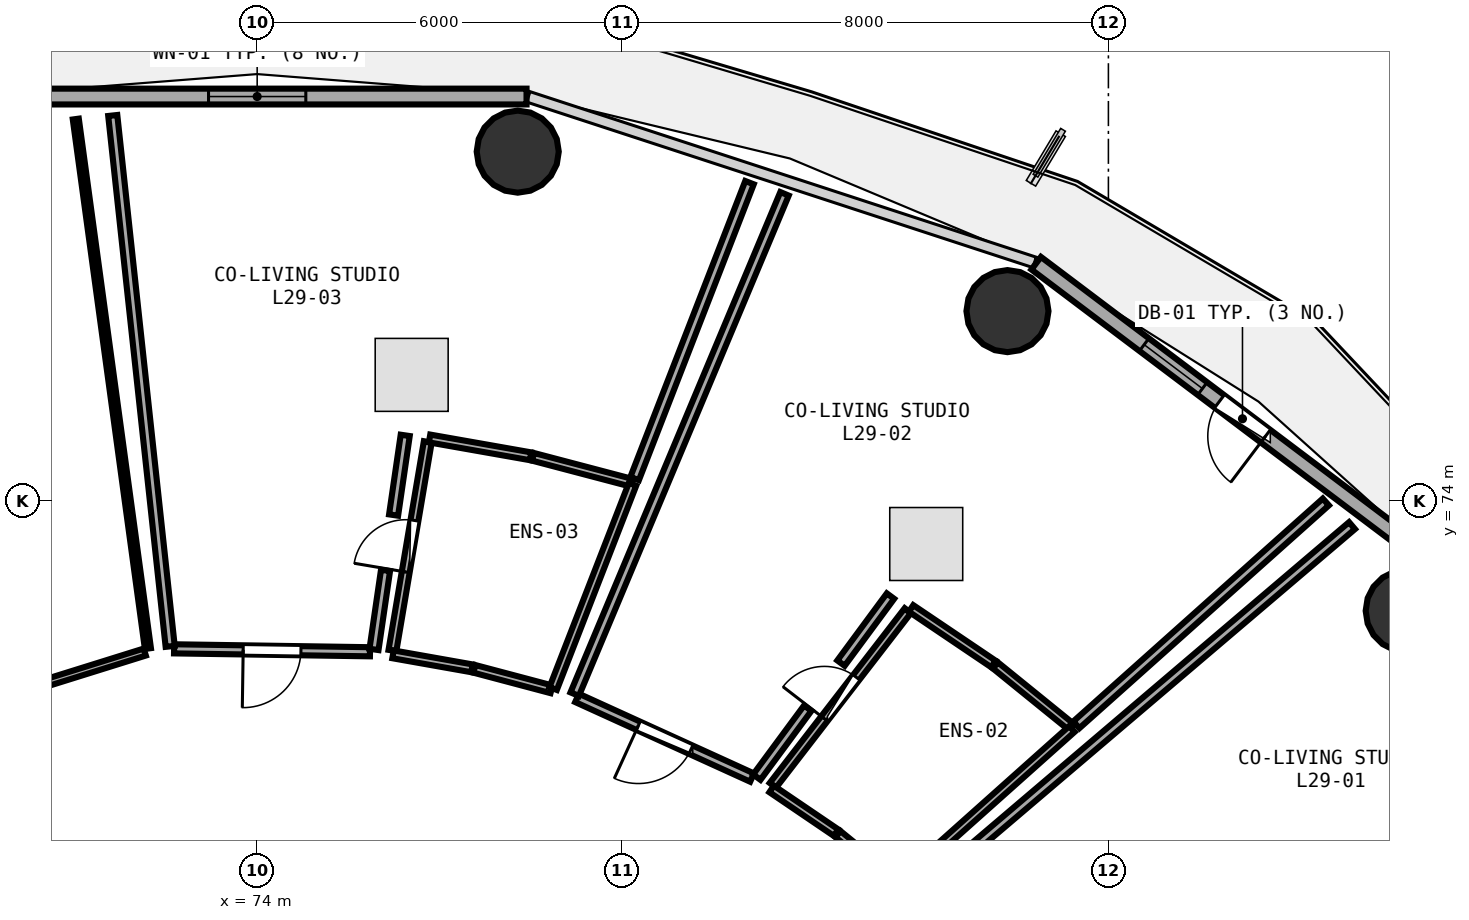
"""IFC4 building model, lengths in metres.
Left out: names, types, materials, properties, quantities, classifications, styles, units other than length and angle.
Written with IfcOpenShell. Run it as: python <this file> out.ifc"""

import sys

from ifc_helpers import new_model, si_unit, direction, frame, frame_2d, origin, origin_2d, place, context, subcontext, project, spatial, rectangle, circle, extrude, element, fill, save


model = new_model("IFC4")
c1 = context("Model", 3, precision=1e-05, world=origin(), true_north=direction((0.0, 1.0)))
c2 = subcontext(c1, "Body", "Model", "MODEL_VIEW")
j1 = project(units=[si_unit("LENGTHUNIT", "METRE"), si_unit("PLANEANGLEUNIT", "RADIAN")], contexts=[c1])
p1 = place(None, origin())
s1 = spatial("IfcSite", under=j1, at=p1, CompositionType="ELEMENT")
p2 = place(p1, origin())
s2 = spatial("IfcBuilding", under=s1, at=p2, CompositionType="ELEMENT")
p3 = place(p2, frame((0.0, 0.0, 113.85)))
s3 = spatial("IfcBuildingStorey", under=s2, at=p3, CompositionType="ELEMENT", Elevation=113.85)
for number, where, z_axis, x_axis in (
    (1, (92.906, 72.193, 0.0), (0.0, 0.0, 1.0), (1.0, 0.0, 0.0)),
    (2, (86.34, 77.122, 0.0), (0.0, 0.0, 1.0), (1.0, 0.0, 0.0)),
    (3, (78.286, 79.745, 0.0), (0.0, 0.0, 1.0), (1.0, 0.0, 0.0)),
):
    element("IfcColumn", number, at=place(p3, frame(where, z_axis=z_axis, x_axis=x_axis)), inside=s3, PredefinedType="COLUMN", context=c2, shape_type="SweptSolid", body=[
        extrude(circle(Radius=0.675, at=origin_2d()), origin(), (0.0, 0.0, 1.0), 3.75),
    ])
p4 = place(p3, frame((93.599, 72.793, 0.0), z_axis=(0.0, 0.0, 1.0), x_axis=(-0.798501507879, 0.601992808857, 0.0)))
e4 = element("IfcWall", 4, at=p4, inside=s3, PredefinedType="SOLIDWALL", context=c2, shape_type="SweptSolid", body=[
    extrude(rectangle(XDim=8.499, YDim=0.26, at=frame_2d((4.25, 0.0))), origin(), (0.0, 0.0, 1.0), 3.475),
])
p5 = place(p4, frame((3.775, 0.0, 0.0)))
e5 = element("IfcOpeningElement", 5, at=p5, cuts=e4, PredefinedType="OPENING", context=c2, shape_type="SweptSolid", body=[
    extrude(rectangle(XDim=0.95, YDim=2.1, at=frame_2d((0.475, 1.05))), frame((0.0, 0.14, 0.0), z_axis=(0.0, -1.0, 0.0), x_axis=(1.0, 0.0, 0.0)), (0.0, 0.0, 1.0), 0.28),
])
p6 = place(p4, frame((5.075, 0.0, 0.85)))
e6 = element("IfcOpeningElement", 6, at=p6, cuts=e4, PredefinedType="OPENING", context=c2, shape_type="SweptSolid", body=[
    extrude(rectangle(XDim=1.2, YDim=1.45, at=frame_2d((0.6, 0.725))), frame((0.0, 0.14, 0.0), z_axis=(0.0, -1.0, 0.0), x_axis=(1.0, 0.0, 0.0)), (0.0, 0.0, 1.0), 0.28),
])
p7 = place(p3, frame((78.43, 80.651, 0.0), z_axis=(0.0, 0.0, 1.0), x_axis=(-1.0, 0.0, 0.0)))
e7 = element("IfcWall", 7, at=p7, inside=s3, PredefinedType="SOLIDWALL", context=c2, shape_type="SweptSolid", body=[
    extrude(rectangle(XDim=8.861, YDim=0.26, at=frame_2d((4.43, 0.0))), origin(), (0.0, 0.0, 1.0), 3.475),
])
p8 = place(p7, frame((3.63, 0.0, 0.85)))
e8 = element("IfcOpeningElement", 8, at=p8, cuts=e7, PredefinedType="OPENING", context=c2, shape_type="SweptSolid", body=[
    extrude(rectangle(XDim=1.6, YDim=1.45, at=frame_2d((0.8, 0.725))), frame((0.0, 0.14, 0.0), z_axis=(0.0, -1.0, 0.0), x_axis=(1.0, 0.0, 0.0)), (0.0, 0.0, 1.0), 0.28),
])
p9 = place(p3, frame((82.482, 69.323, 0.0), z_axis=(0.0, 0.0, 1.0), x_axis=(0.611256142659, 0.791432832312, 0.0)))
e9 = element("IfcWall", 9, at=p9, inside=s3, PredefinedType="PLUMBINGWALL", context=c2, shape_type="SweptSolid", body=[
    extrude(rectangle(XDim=3.631, YDim=0.13, at=frame_2d((1.816, 0.0))), origin(), (0.0, 0.0, 1.0), 2.925),
])
p10 = place(p9, frame((1.386, 0.0, 0.0)))
e10 = element("IfcOpeningElement", 10, at=p10, cuts=e9, PredefinedType="OPENING", context=c2, shape_type="SweptSolid", body=[
    extrude(rectangle(XDim=0.86, YDim=2.05, at=frame_2d((0.43, 1.025))), frame((0.0, 0.075, 0.0), z_axis=(0.0, -1.0, 0.0), x_axis=(1.0, 0.0, 0.0)), (0.0, 0.0, 1.0), 0.15),
])
p11 = place(p3, frame((82.139, 69.451, 0.0), z_axis=(0.0, 0.0, 1.0), x_axis=(-0.910125689736, 0.414332268696, 0.0)))
e11 = element("IfcWall", 11, at=p11, inside=s3, PredefinedType="PARTITIONING", context=c2, shape_type="SweptSolid", body=[
    extrude(rectangle(XDim=3.162, YDim=0.15, at=frame_2d((1.581, 0.0))), origin(), (0.0, 0.0, 1.0), 2.925),
])
p12 = place(p11, frame((1.106, 0.0, 0.0)))
e12 = element("IfcOpeningElement", 12, at=p12, cuts=e11, PredefinedType="OPENING", context=c2, shape_type="SweptSolid", body=[
    extrude(rectangle(XDim=0.95, YDim=2.08, at=frame_2d((0.475, 1.04))), frame((0.0, 0.085, 0.0), z_axis=(0.0, -1.0, 0.0), x_axis=(1.0, 0.0, 0.0)), (0.0, 0.0, 1.0), 0.17),
])
p13 = place(p3, frame((76.225, 71.54, 0.0), z_axis=(0.0, 0.0, 1.0), x_axis=(0.166889779655, 0.98597555824, 0.0)))
e13 = element("IfcWall", 13, at=p13, inside=s3, PredefinedType="PLUMBINGWALL", context=c2, shape_type="SweptSolid", body=[
    extrude(rectangle(XDim=3.48, YDim=0.13, at=frame_2d((1.74, 0.0))), origin(), (0.0, 0.0, 1.0), 3.175),
])
p14 = place(p13, frame((1.31, 0.0, 0.0)))
e14 = element("IfcOpeningElement", 14, at=p14, cuts=e13, PredefinedType="OPENING", context=c2, shape_type="SweptSolid", body=[
    extrude(rectangle(XDim=0.86, YDim=2.05, at=frame_2d((0.43, 1.025))), frame((0.0, 0.075, 0.0), z_axis=(0.0, -1.0, 0.0), x_axis=(1.0, 0.0, 0.0)), (0.0, 0.0, 1.0), 0.15),
])
p15 = place(p3, frame((75.856, 71.52, 0.0), z_axis=(0.0, 0.0, 1.0), x_axis=(-0.999888601473, 0.014925972152, 0.0)))
e15 = element("IfcWall", 15, at=p15, inside=s3, PredefinedType="PARTITIONING", context=c2, shape_type="SweptSolid", body=[
    extrude(rectangle(XDim=3.222, YDim=0.15, at=frame_2d((1.611, 0.0))), origin(), (0.0, 0.0, 1.0), 3.48),
])
p16 = place(p15, frame((1.136, 0.0, 0.0)))
e16 = element("IfcOpeningElement", 16, at=p16, cuts=e15, PredefinedType="OPENING", context=c2, shape_type="SweptSolid", body=[
    extrude(rectangle(XDim=0.95, YDim=2.08, at=frame_2d((0.475, 1.04))), frame((0.0, 0.085, 0.0), z_axis=(0.0, -1.0, 0.0), x_axis=(1.0, 0.0, 0.0)), (0.0, 0.0, 1.0), 0.17),
])
p17 = place(p3, frame((72.152, 71.515, 0.0), z_axis=(0.0, 0.0, 1.0), x_axis=(-0.954537176379, -0.298091896753, 0.0)))
e17 = element("IfcWall", 17, at=p17, inside=s3, PredefinedType="PARTITIONING", context=c2, shape_type="SweptSolid", body=[
    extrude(rectangle(XDim=6.15, YDim=0.12, at=frame_2d((3.075, 0.0))), origin(), (0.0, 0.0, 1.0), 2.925),
])
p18 = place(p17, frame((2.625, 0.0, 0.0)))
e18 = element("IfcOpeningElement", 18, at=p18, cuts=e17, PredefinedType="OPENING", context=c2, shape_type="SweptSolid", body=[
    extrude(rectangle(XDim=0.9, YDim=2.08, at=frame_2d((0.45, 1.04))), frame((0.0, 0.07, 0.0), z_axis=(0.0, -1.0, 0.0), x_axis=(1.0, 0.0, 0.0)), (0.0, 0.0, 1.0), 0.14),
])
p19 = place(p3, frame((84.84, 67.497, 0.0), z_axis=(0.0, 0.0, 1.0), x_axis=(0.761665255774, 0.647970707784, 0.0)))
e19 = element("IfcWall", 19, at=p19, inside=s3, PredefinedType="PARTITIONING", context=c2, shape_type="SweptSolid", body=[
    extrude(rectangle(XDim=9.41, YDim=0.15, at=frame_2d((4.705, 0.0))), origin(), (0.0, 0.0, 1.0), 2.975),
])
p20 = place(p3, frame((84.535, 67.719, 0.0), z_axis=(0.0, 0.0, 1.0), x_axis=(-0.77480548173, 0.632199703796, 0.0)))
e20 = element("IfcWall", 20, at=p20, inside=s3, PredefinedType="PLUMBINGWALL", context=c2, shape_type="SweptSolid", body=[
    extrude(rectangle(XDim=1.269, YDim=0.13, at=frame_2d((0.634, 0.0))), origin(), (0.0, 0.0, 1.0), 3.48),
])
p21 = place(p3, frame((83.521, 68.545, 0.0), z_axis=(0.0, 0.0, 1.0), x_axis=(-0.827444121362, 0.561548062077, 0.0)))
e21 = element("IfcWall", 21, at=p21, inside=s3, PredefinedType="PLUMBINGWALL", context=c2, shape_type="SweptSolid", body=[
    extrude(rectangle(XDim=1.28, YDim=0.13, at=frame_2d((0.64, 0.0))), origin(), (0.0, 0.0, 1.0), 2.925),
])
p22 = place(p3, frame((84.755, 72.233, 0.0), z_axis=(0.0, 0.0, 1.0), x_axis=(0.829027028084, -0.559208535974, 0.0)))
e22 = element("IfcWall", 22, at=p22, inside=s3, PredefinedType="PLUMBINGWALL", context=c2, shape_type="SweptSolid", body=[
    extrude(rectangle(XDim=1.634, YDim=0.13, at=frame_2d((0.817, 0.0))), origin(), (0.0, 0.0, 1.0), 2.925),
])
p23 = place(p3, frame((86.142, 71.295, 0.0), z_axis=(0.0, 0.0, 1.0), x_axis=(0.776777676314, -0.629774913425, 0.0)))
e23 = element("IfcWall", 23, at=p23, inside=s3, PredefinedType="PLUMBINGWALL", context=c2, shape_type="SweptSolid", body=[
    extrude(rectangle(XDim=1.619, YDim=0.13, at=frame_2d((0.81, 0.0))), origin(), (0.0, 0.0, 1.0), 3.175),
])
p24 = place(p3, frame((87.4, 70.25, 0.0), z_axis=(0.0, 0.0, 1.0), x_axis=(-0.746071060308, -0.66586633266, 0.0)))
e24 = element("IfcWall", 24, at=p24, inside=s3, PredefinedType="PLUMBINGWALL", context=c2, shape_type="SweptSolid", body=[
    extrude(rectangle(XDim=3.799, YDim=0.13, at=frame_2d((1.899, 0.0))), origin(), (0.0, 0.0, 1.0), 3.175),
])
p25 = place(p3, frame((79.222, 70.823, 0.0), z_axis=(0.0, 0.0, 1.0), x_axis=(0.386794233591, 0.922166048421, 0.0)))
e25 = element("IfcWall", 25, at=p25, inside=s3, PredefinedType="PARTITIONING", context=c2, shape_type="SweptSolid", body=[
    extrude(rectangle(XDim=8.923, YDim=0.15, at=frame_2d((4.461, 0.0))), origin(), (0.0, 0.0, 1.0), 2.925),
])
p26 = place(p3, frame((91.576, 73.983, 0.0), z_axis=(0.0, 0.0, 1.0), x_axis=(-0.745832931832, -0.666133048118, 0.0)))
e26 = element("IfcWall", 26, at=p26, inside=s3, PredefinedType="PARTITIONING", context=c2, shape_type="SweptSolid", body=[
    extrude(rectangle(XDim=5.502, YDim=0.15, at=frame_2d((2.751, 0.0))), origin(), (0.0, 0.0, 1.0), 2.975),
])
p27 = place(p3, frame((84.416, 72.436, 0.0), z_axis=(0.0, 0.0, 1.0), x_axis=(-0.593970327987, -0.804486947981, 0.0)))
e27 = element("IfcWall", 27, at=p27, inside=s3, PredefinedType="PARTITIONING", context=c2, shape_type="SweptSolid", body=[
    extrude(rectangle(XDim=1.371, YDim=0.15, at=frame_2d((0.686, 0.0))), origin(), (0.0, 0.0, 1.0), 3.175),
])
p28 = place(p3, frame((83.055, 70.593, 0.0), z_axis=(0.0, 0.0, 1.0), x_axis=(-0.593972361968, -0.804485446244, 0.0)))
e28 = element("IfcWall", 28, at=p28, inside=s3, PredefinedType="PARTITIONING", context=c2, shape_type="SweptSolid", body=[
    extrude(rectangle(XDim=1.41, YDim=0.15, at=frame_2d((0.705, 0.0))), origin(), (0.0, 0.0, 1.0), 3.235),
])
p29 = place(p3, frame((78.842, 70.902, 0.0), z_axis=(0.0, 0.0, 1.0), x_axis=(-0.966542750929, 0.256505576208, 0.0)))
e29 = element("IfcWall", 29, at=p29, inside=s3, PredefinedType="PLUMBINGWALL", context=c2, shape_type="SweptSolid", body=[
    extrude(rectangle(XDim=1.313, YDim=0.13, at=frame_2d((0.657, 0.0))), origin(), (0.0, 0.0, 1.0), 3.48),
])
p30 = place(p3, frame((77.533, 71.248, 0.0), z_axis=(0.0, 0.0, 1.0), x_axis=(-0.984677145685, 0.174387266636, 0.0)))
e30 = element("IfcWall", 30, at=p30, inside=s3, PredefinedType="PLUMBINGWALL", context=c2, shape_type="SweptSolid", body=[
    extrude(rectangle(XDim=1.319, YDim=0.13, at=frame_2d((0.659, 0.0))), origin(), (0.0, 0.0, 1.0), 3.48),
])
p31 = place(p3, frame((76.836, 75.028, 0.0), z_axis=(0.0, 0.0, 1.0), x_axis=(0.984809767924, -0.173636750148, 0.0)))
e31 = element("IfcWall", 31, at=p31, inside=s3, PredefinedType="PLUMBINGWALL", context=c2, shape_type="SweptSolid", body=[
    extrude(rectangle(XDim=1.687, YDim=0.13, at=frame_2d((0.844, 0.0))), origin(), (0.0, 0.0, 1.0), 3.48),
])
p32 = place(p3, frame((78.536, 74.726, 0.0), z_axis=(0.0, 0.0, 1.0), x_axis=(0.96706889178, -0.254514751149, 0.0)))
e32 = element("IfcWall", 32, at=p32, inside=s3, PredefinedType="PLUMBINGWALL", context=c2, shape_type="SweptSolid", body=[
    extrude(rectangle(XDim=1.681, YDim=0.13, at=frame_2d((0.84, 0.0))), origin(), (0.0, 0.0, 1.0), 2.925),
])
p33 = place(p3, frame((80.174, 74.274, 0.0), z_axis=(0.0, 0.0, 1.0), x_axis=(-0.362308947709, -0.93205805957, 0.0)))
e33 = element("IfcWall", 33, at=p33, inside=s3, PredefinedType="PLUMBINGWALL", context=c2, shape_type="SweptSolid", body=[
    extrude(rectangle(XDim=3.604, YDim=0.13, at=frame_2d((1.802, 0.0))), origin(), (0.0, 0.0, 1.0), 2.925),
])
p34 = place(p3, frame((72.57, 71.609, 0.0), z_axis=(0.0, 0.0, 1.0), x_axis=(-0.107541262508, 0.994200622037, 0.0)))
e34 = element("IfcWall", 34, at=p34, inside=s3, PredefinedType="PARTITIONING", context=c2, shape_type="SweptSolid", body=[
    extrude(rectangle(XDim=8.781, YDim=0.15, at=frame_2d((4.391, 0.0))), origin(), (0.0, 0.0, 1.0), 2.975),
])
p35 = place(p3, frame((82.097, 79.235, 0.0), z_axis=(0.0, 0.0, 1.0), x_axis=(-0.361863878041, -0.932230944439, 0.0)))
e35 = element("IfcWall", 35, at=p35, inside=s3, PredefinedType="PARTITIONING", context=c2, shape_type="SweptSolid", body=[
    extrude(rectangle(XDim=5.22, YDim=0.15, at=frame_2d((2.61, 0.0))), origin(), (0.0, 0.0, 1.0), 2.975),
])
p36 = place(p3, frame((76.435, 75.078, 0.0), z_axis=(0.0, 0.0, 1.0), x_axis=(-0.14438965177, -0.989520908552, 0.0)))
e36 = element("IfcWall", 36, at=p36, inside=s3, PredefinedType="PARTITIONING", context=c2, shape_type="SweptSolid", body=[
    extrude(rectangle(XDim=1.324, YDim=0.15, at=frame_2d((0.662, 0.0))), origin(), (0.0, 0.0, 1.0), 3.175),
])
p37 = place(p3, frame((76.111, 72.858, 0.0), z_axis=(0.0, 0.0, 1.0), x_axis=(-0.14431068671, -0.989532427817, 0.0)))
e37 = element("IfcWall", 37, at=p37, inside=s3, PredefinedType="PARTITIONING", context=c2, shape_type="SweptSolid", body=[
    extrude(rectangle(XDim=1.313, YDim=0.15, at=frame_2d((0.656, 0.0))), origin(), (0.0, 0.0, 1.0), 3.48),
])
p38 = place(p3, frame((71.017, 80.281, 0.0), z_axis=(0.0, 0.0, 1.0), x_axis=(0.134981799135, -0.990848078114, 0.0)))
e38 = element("IfcWall", 38, at=p38, inside=s3, PredefinedType="PARTITIONING", context=c2, shape_type="SweptSolid", body=[
    extrude(rectangle(XDim=8.788, YDim=0.1, at=frame_2d((4.394, 0.0))), origin(), (0.0, 0.0, 1.0), 2.975),
])
p39 = place(p5, frame((0.95, 0.0, 0.0), z_axis=(0.0, 0.0, 1.0), x_axis=(-1.0, 0.0, 0.0)))
e39 = element("IfcDoor", 39, at=p39, inside=s3, OperationType="SINGLE_SWING_RIGHT", PredefinedType="DOOR", context=c2, shape_type="SweptSolid", body=[
    extrude(rectangle(XDim=0.95, YDim=2.1, at=frame_2d((0.475, 1.05))), frame((0.0, 0.025, 0.0), z_axis=(0.0, -1.0, 0.0), x_axis=(1.0, 0.0, 0.0)), (0.0, 0.0, 1.0), 0.05),
])
fill(e5, e39)
p40 = place(p6, origin())
e40 = element("IfcWindow", 40, at=p40, inside=s3, PartitioningType="SINGLE_PANEL", PredefinedType="WINDOW", context=c2, shape_type="SweptSolid", body=[
    extrude(rectangle(XDim=1.2, YDim=1.45, at=frame_2d((0.6, 0.725))), frame((0.0, 0.03, 0.0), z_axis=(0.0, -1.0, 0.0), x_axis=(1.0, 0.0, 0.0)), (0.0, 0.0, 1.0), 0.06),
])
fill(e6, e40)
p41 = place(p8, origin())
e41 = element("IfcWindow", 41, at=p41, inside=s3, PartitioningType="SINGLE_PANEL", PredefinedType="WINDOW", context=c2, shape_type="SweptSolid", body=[
    extrude(rectangle(XDim=1.6, YDim=1.45, at=frame_2d((0.8, 0.725))), frame((0.0, 0.03, 0.0), z_axis=(0.0, -1.0, 0.0), x_axis=(1.0, 0.0, 0.0)), (0.0, 0.0, 1.0), 0.06),
])
fill(e8, e41)
p42 = place(p10, origin())
e42 = element("IfcDoor", 42, at=p42, inside=s3, OperationType="SINGLE_SWING_LEFT", PredefinedType="DOOR", context=c2, shape_type="SweptSolid", body=[
    extrude(rectangle(XDim=0.86, YDim=2.05, at=frame_2d((0.43, 1.025))), frame((0.0, 0.025, 0.0), z_axis=(0.0, -1.0, 0.0), x_axis=(1.0, 0.0, 0.0)), (0.0, 0.0, 1.0), 0.05),
])
fill(e10, e42)
p43 = place(p12, origin())
e43 = element("IfcDoor", 43, at=p43, inside=s3, OperationType="SINGLE_SWING_RIGHT", PredefinedType="DOOR", context=c2, shape_type="SweptSolid", body=[
    extrude(rectangle(XDim=0.95, YDim=2.08, at=frame_2d((0.475, 1.04))), frame((0.0, 0.025, 0.0), z_axis=(0.0, -1.0, 0.0), x_axis=(1.0, 0.0, 0.0)), (0.0, 0.0, 1.0), 0.05),
])
fill(e12, e43)
p44 = place(p14, origin())
e44 = element("IfcDoor", 44, at=p44, inside=s3, OperationType="SINGLE_SWING_LEFT", PredefinedType="DOOR", context=c2, shape_type="SweptSolid", body=[
    extrude(rectangle(XDim=0.86, YDim=2.05, at=frame_2d((0.43, 1.025))), frame((0.0, 0.025, 0.0), z_axis=(0.0, -1.0, 0.0), x_axis=(1.0, 0.0, 0.0)), (0.0, 0.0, 1.0), 0.05),
])
fill(e14, e44)
p45 = place(p16, origin())
e45 = element("IfcDoor", 45, at=p45, inside=s3, OperationType="SINGLE_SWING_RIGHT", PredefinedType="DOOR", context=c2, shape_type="SweptSolid", body=[
    extrude(rectangle(XDim=0.95, YDim=2.08, at=frame_2d((0.475, 1.04))), frame((0.0, 0.025, 0.0), z_axis=(0.0, -1.0, 0.0), x_axis=(1.0, 0.0, 0.0)), (0.0, 0.0, 1.0), 0.05),
])
fill(e16, e45)
save(model, sys.argv[1])
